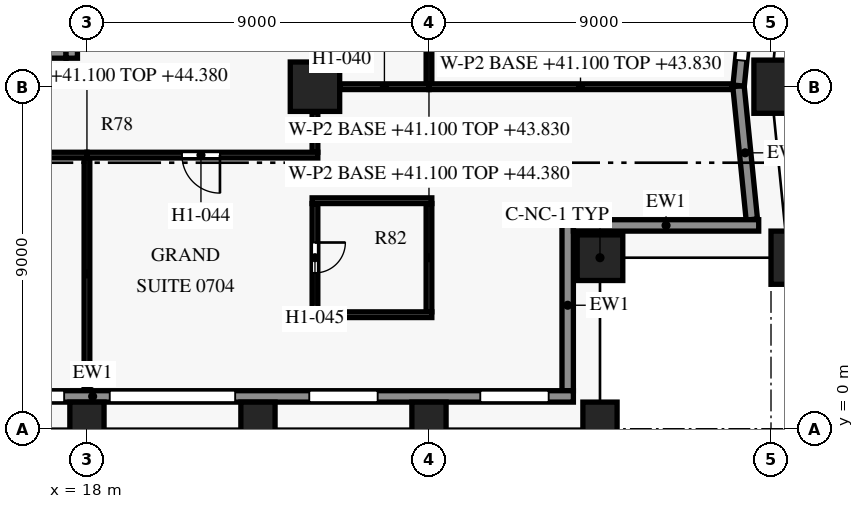
"""IFC4 building model, lengths in metres.
Left out: names, types, materials, properties, quantities, classifications, styles, units other than length and angle.
Written with IfcOpenShell. Run it as: python <this file> out.ifc"""

import sys

from ifc_helpers import new_model, si_unit, direction, frame, frame_2d, origin, origin_2d, place, context, subcontext, project, spatial, rectangle, extrude, element, fill, save


model = new_model("IFC4")
c1 = context("Model", 3, precision=1e-05, world=origin(), true_north=direction((0.0, 1.0)))
c2 = subcontext(c1, "Body", "Model", "MODEL_VIEW")
j1 = project(units=[si_unit("LENGTHUNIT", "METRE"), si_unit("PLANEANGLEUNIT", "RADIAN")], contexts=[c1])
p1 = place(None, origin())
s1 = spatial("IfcSite", under=j1, at=p1, CompositionType="ELEMENT")
p2 = place(p1, origin())
s2 = spatial("IfcBuilding", under=s1, at=p2, CompositionType="ELEMENT")
p3 = place(p2, frame((0.0, 0.0, 41.1)))
s3 = spatial("IfcBuildingStorey", under=s2, at=p3, CompositionType="ELEMENT", Elevation=41.1)
for number, where, z_axis, x_axis in (
    (1, (18.0, 0.0, 0.0), (0.0, 0.0, 1.0), (1.0, 0.0, 0.0)),
    (2, (22.5, 0.0, 0.0), (0.0, 0.0, 1.0), (1.0, 0.0, 0.0)),
    (3, (27.0, 0.0, 0.0), (0.0, 0.0, 1.0), (1.0, 0.0, 0.0)),
    (4, (31.5, 0.0, 0.0), (0.0, 0.0, 1.0), (1.0, 0.0, 0.0)),
    (5, (36.45, 4.5, 0.0), (0.0, 0.0, 1.0), (-0.1, 0.995, 0.0)),
    (6, (36.0, 9.0, 0.0), (0.0, 0.0, 1.0), (0.0, 1.0, 0.0)),
):
    element("IfcColumn", number, at=place(p3, frame(where, z_axis=z_axis, x_axis=x_axis)), inside=s3, PredefinedType="COLUMN", context=c2, shape_type="SweptSolid", body=[
        extrude(rectangle(XDim=0.9, YDim=1.4, at=origin_2d()), origin(), (0.0, 0.0, 1.0), 3.6),
    ])
p4 = place(p3, frame((31.5, 4.5, 0.0), z_axis=(0.0, 0.0, 1.0), x_axis=(1.0, 0.0, 0.0)))
e7 = element("IfcColumn", 7, at=p4, inside=s3, PredefinedType="COLUMN", context=c2, shape_type="SweptSolid", body=[
    extrude(rectangle(XDim=1.2, YDim=1.2, at=origin_2d()), origin(), (0.0, 0.0, 1.0), 3.6),
])
p5 = place(p3, frame((24.0, 9.0, 0.0), z_axis=(0.0, 0.0, 1.0), x_axis=(1.0, 0.0, 0.0)))
e8 = element("IfcColumn", 8, at=p5, inside=s3, PredefinedType="COLUMN", context=c2, shape_type="SweptSolid", body=[
    extrude(rectangle(XDim=1.3, YDim=1.3, at=origin_2d()), origin(), (0.0, 0.0, 1.0), 3.6),
])
p6 = place(p3, frame((30.8, 0.85, 0.0), z_axis=(0.0, 0.0, 1.0), x_axis=(-1.0, 0.0, 0.0)))
e9 = element("IfcWall", 9, at=p6, inside=s3, PredefinedType="SOLIDWALL", context=c2, shape_type="SweptSolid", body=[
    extrude(rectangle(XDim=25.3, YDim=0.3, at=frame_2d((12.65, 0.0))), origin(), (0.0, 0.0, 1.0), 2.95),
])
p7 = place(p6, frame((0.65, 0.0, 0.75)))
e10 = element("IfcOpeningElement", 10, at=p7, cuts=e9, PredefinedType="OPENING", context=c2, shape_type="SweptSolid", body=[
    extrude(rectangle(XDim=1.8, YDim=1.8, at=frame_2d((0.9, 0.9))), frame((0.0, 0.16, 0.0), z_axis=(0.0, -1.0, 0.0), x_axis=(1.0, 0.0, 0.0)), (0.0, 0.0, 1.0), 0.32),
])
p8 = place(p6, frame((5.15, 0.0, 0.75)))
e11 = element("IfcOpeningElement", 11, at=p8, cuts=e9, PredefinedType="OPENING", context=c2, shape_type="SweptSolid", body=[
    extrude(rectangle(XDim=1.8, YDim=1.8, at=frame_2d((0.9, 0.9))), frame((0.0, 0.16, 0.0), z_axis=(0.0, -1.0, 0.0), x_axis=(1.0, 0.0, 0.0)), (0.0, 0.0, 1.0), 0.32),
])
p9 = place(p6, frame((8.9, 0.0, 0.15)))
e12 = element("IfcOpeningElement", 12, at=p9, cuts=e9, PredefinedType="OPENING", context=c2, shape_type="SweptSolid", body=[
    extrude(rectangle(XDim=3.3, YDim=2.4, at=frame_2d((1.65, 1.2))), frame((0.0, 0.16, 0.0), z_axis=(0.0, -1.0, 0.0), x_axis=(1.0, 0.0, 0.0)), (0.0, 0.0, 1.0), 0.32),
])
p10 = place(p6, frame((13.4, 0.0, 0.15)))
e13 = element("IfcOpeningElement", 13, at=p10, cuts=e9, PredefinedType="OPENING", context=c2, shape_type="SweptSolid", body=[
    extrude(rectangle(XDim=3.3, YDim=2.4, at=frame_2d((1.65, 1.2))), frame((0.0, 0.16, 0.0), z_axis=(0.0, -1.0, 0.0), x_axis=(1.0, 0.0, 0.0)), (0.0, 0.0, 1.0), 0.32),
])
p11 = place(p6, frame((18.65, 0.0, 0.75)))
e14 = element("IfcOpeningElement", 14, at=p11, cuts=e9, PredefinedType="OPENING", context=c2, shape_type="SweptSolid", body=[
    extrude(rectangle(XDim=1.8, YDim=1.8, at=frame_2d((0.9, 0.9))), frame((0.0, 0.16, 0.0), z_axis=(0.0, -1.0, 0.0), x_axis=(1.0, 0.0, 0.0)), (0.0, 0.0, 1.0), 0.32),
])
p12 = place(p6, frame((23.15, 0.0, 0.75)))
e15 = element("IfcOpeningElement", 15, at=p12, cuts=e9, PredefinedType="OPENING", context=c2, shape_type="SweptSolid", body=[
    extrude(rectangle(XDim=1.8, YDim=1.8, at=frame_2d((0.9, 0.9))), frame((0.0, 0.16, 0.0), z_axis=(0.0, -1.0, 0.0), x_axis=(1.0, 0.0, 0.0)), (0.0, 0.0, 1.0), 0.32),
])
p13 = place(p3, frame((30.65, 5.5, 0.0), z_axis=(0.0, 0.0, 1.0), x_axis=(0.0, -1.0, 0.0)))
e16 = element("IfcWall", 16, at=p13, inside=s3, PredefinedType="SOLIDWALL", context=c2, shape_type="SweptSolid", body=[
    extrude(rectangle(XDim=4.502, YDim=0.3, at=frame_2d((2.251, 0.0))), origin(), (0.0, 0.0, 1.0), 2.95),
])
p14 = place(p3, frame((35.677, 5.35, 0.0), z_axis=(0.0, 0.0, 1.0), x_axis=(-1.0, 0.0, 0.0)))
e17 = element("IfcWall", 17, at=p14, inside=s3, PredefinedType="SOLIDWALL", context=c2, shape_type="SweptSolid", body=[
    extrude(rectangle(XDim=4.876, YDim=0.3, at=frame_2d((2.438, 0.0))), origin(), (0.0, 0.0, 1.0), 2.95),
])
p15 = place(p3, frame((35.144, 9.015, 0.0), z_axis=(0.0, 0.0, 1.0), x_axis=(0.099462600847, -0.995041301169, 0.0)))
e18 = element("IfcWall", 18, at=p15, inside=s3, PredefinedType="SOLIDWALL", context=c2, shape_type="SweptSolid", body=[
    extrude(rectangle(XDim=3.527, YDim=0.3, at=frame_2d((1.764, 0.0))), origin(), (0.0, 0.0, 1.0), 2.95),
])
p16 = place(p3, frame((36.047, 18.015, 0.0), z_axis=(0.0, 0.0, 1.0), x_axis=(-0.099522457379, -0.995035316196, 0.0)))
e19 = element("IfcWall", 19, at=p16, inside=s3, PredefinedType="SOLIDWALL", context=c2, shape_type="SweptSolid", body=[
    extrude(rectangle(XDim=9.03, YDim=0.3, at=frame_2d((4.515, 0.0))), origin(), (0.0, 0.0, 1.0), 2.95),
])
p17 = place(p16, frame((1.291, 0.0, 0.75)))
e20 = element("IfcOpeningElement", 20, at=p17, cuts=e19, PredefinedType="OPENING", context=c2, shape_type="SweptSolid", body=[
    extrude(rectangle(XDim=1.8, YDim=1.8, at=frame_2d((0.9, 0.9))), frame((0.0, 0.16, 0.0), z_axis=(0.0, -1.0, 0.0), x_axis=(1.0, 0.0, 0.0)), (0.0, 0.0, 1.0), 0.32),
])
p18 = place(p16, frame((5.064, 0.0, 0.15)))
e21 = element("IfcOpeningElement", 21, at=p18, cuts=e19, PredefinedType="OPENING", context=c2, shape_type="SweptSolid", body=[
    extrude(rectangle(XDim=3.3, YDim=2.4, at=frame_2d((1.65, 1.2))), frame((0.0, 0.16, 0.0), z_axis=(0.0, -1.0, 0.0), x_axis=(1.0, 0.0, 0.0)), (0.0, 0.0, 1.0), 0.32),
])
p19 = place(p3, frame((14.15, 9.9, 0.0), z_axis=(0.0, 0.0, 1.0), x_axis=(1.0, 0.0, 0.0)))
e22 = element("IfcWall", 22, at=p19, inside=s3, PredefinedType="SHEAR", context=c2, shape_type="SweptSolid", body=[
    extrude(rectangle(XDim=3.3, YDim=0.3, at=frame_2d((1.65, 0.0))), origin(), (0.0, 0.0, 1.0), 3.3),
])
p20 = place(p3, frame((17.6, 9.75, 0.0), z_axis=(0.0, 0.0, 1.0), x_axis=(0.0, 1.0, 0.0)))
e23 = element("IfcWall", 23, at=p20, inside=s3, PredefinedType="SHEAR", context=c2, shape_type="SweptSolid", body=[
    extrude(rectangle(XDim=8.3, YDim=0.3, at=frame_2d((4.15, 0.0))), origin(), (0.0, 0.0, 1.0), 3.3),
])
p21 = place(p20, frame((0.65, 0.0, 0.0)))
e24 = element("IfcOpeningElement", 24, at=p21, cuts=e23, PredefinedType="OPENING", context=c2, shape_type="SweptSolid", body=[
    extrude(rectangle(XDim=1.2, YDim=2.2, at=frame_2d((0.6, 1.1))), frame((0.0, 0.16, 0.0), z_axis=(0.0, -1.0, 0.0), x_axis=(1.0, 0.0, 0.0)), (0.0, 0.0, 1.0), 0.32),
])
p22 = place(p3, frame((23.925, 3.0, 0.0), z_axis=(0.0, 0.0, 1.0), x_axis=(1.0, 0.0, 0.0)))
e25 = element("IfcWall", 25, at=p22, inside=s3, PredefinedType="PARTITIONING", context=c2, shape_type="SweptSolid", body=[
    extrude(rectangle(XDim=3.15, YDim=0.15, at=frame_2d((1.575, 0.0))), origin(), (0.0, 0.0, 1.0), 2.58),
])
p23 = place(p3, frame((27.0, 3.075, 0.0), z_axis=(0.0, 0.0, 1.0), x_axis=(0.0, 1.0, 0.0)))
e26 = element("IfcWall", 26, at=p23, inside=s3, PredefinedType="PARTITIONING", context=c2, shape_type="SweptSolid", body=[
    extrude(rectangle(XDim=2.85, YDim=0.15, at=frame_2d((1.425, 0.0))), origin(), (0.0, 0.0, 1.0), 3.28),
])
p24 = place(p3, frame((24.0, 5.925, 0.0), z_axis=(0.0, 0.0, 1.0), x_axis=(0.0, -1.0, 0.0)))
e27 = element("IfcWall", 27, at=p24, inside=s3, PredefinedType="PARTITIONING", context=c2, shape_type="SweptSolid", body=[
    extrude(rectangle(XDim=2.85, YDim=0.15, at=frame_2d((1.425, 0.0))), origin(), (0.0, 0.0, 1.0), 2.58),
])
p25 = place(p24, frame((1.025, 0.0, 0.0)))
e28 = element("IfcOpeningElement", 28, at=p25, cuts=e27, PredefinedType="OPENING", context=c2, shape_type="SweptSolid", body=[
    extrude(rectangle(XDim=0.8, YDim=2.1, at=frame_2d((0.4, 1.05))), frame((0.0, 0.085, 0.0), z_axis=(0.0, -1.0, 0.0), x_axis=(1.0, 0.0, 0.0)), (0.0, 0.0, 1.0), 0.17),
])
p26 = place(p3, frame((27.075, 6.0, 0.0), z_axis=(0.0, 0.0, 1.0), x_axis=(-1.0, 0.0, 0.0)))
e29 = element("IfcWall", 29, at=p26, inside=s3, PredefinedType="PARTITIONING", context=c2, shape_type="SweptSolid", body=[
    extrude(rectangle(XDim=3.15, YDim=0.15, at=frame_2d((1.575, 0.0))), origin(), (0.0, 0.0, 1.0), 2.58),
])
p27 = place(p3, frame((18.0, 7.125, 0.0), z_axis=(0.0, 0.0, 1.0), x_axis=(0.0, -1.0, 0.0)))
e30 = element("IfcWall", 30, at=p27, inside=s3, PredefinedType="PARTITIONING", context=c2, shape_type="SweptSolid", body=[
    extrude(rectangle(XDim=6.105, YDim=0.15, at=frame_2d((3.052, 0.0))), origin(), (0.0, 0.0, 1.0), 3.28),
])
p28 = place(p3, frame((18.0, 7.2, 0.0), z_axis=(0.0, 0.0, 1.0), x_axis=(-1.0, 0.0, 0.0)))
e31 = element("IfcWall", 31, at=p28, inside=s3, PredefinedType="PARTITIONING", context=c2, shape_type="SweptSolid", body=[
    extrude(rectangle(XDim=6.075, YDim=0.15, at=frame_2d((3.038, 0.0))), origin(), (0.0, 0.0, 1.0), 2.58),
])
p29 = place(p28, frame((2.5, 0.0, 0.0)))
e32 = element("IfcOpeningElement", 32, at=p29, cuts=e31, PredefinedType="OPENING", context=c2, shape_type="SweptSolid", body=[
    extrude(rectangle(XDim=1.0, YDim=2.1, at=frame_2d((0.5, 1.05))), frame((0.0, 0.085, 0.0), z_axis=(0.0, -1.0, 0.0), x_axis=(1.0, 0.0, 0.0)), (0.0, 0.0, 1.0), 0.17),
])
p30 = place(p3, frame((24.075, 7.2, 0.0), z_axis=(0.0, 0.0, 1.0), x_axis=(-1.0, 0.0, 0.0)))
e33 = element("IfcWall", 33, at=p30, inside=s3, PredefinedType="PARTITIONING", context=c2, shape_type="SweptSolid", body=[
    extrude(rectangle(XDim=6.075, YDim=0.15, at=frame_2d((3.038, 0.0))), origin(), (0.0, 0.0, 1.0), 2.58),
])
p31 = place(p30, frame((2.575, 0.0, 0.0)))
e34 = element("IfcOpeningElement", 34, at=p31, cuts=e33, PredefinedType="OPENING", context=c2, shape_type="SweptSolid", body=[
    extrude(rectangle(XDim=1.0, YDim=2.1, at=frame_2d((0.5, 1.05))), frame((0.0, 0.085, 0.0), z_axis=(0.0, -1.0, 0.0), x_axis=(1.0, 0.0, 0.0)), (0.0, 0.0, 1.0), 0.17),
])
p32 = place(p3, frame((24.0, 8.345, 0.0), z_axis=(0.0, 0.0, 1.0), x_axis=(0.0, -1.0, 0.0)))
e35 = element("IfcWall", 35, at=p32, inside=s3, PredefinedType="PARTITIONING", context=c2, shape_type="SweptSolid", body=[
    extrude(rectangle(XDim=1.07, YDim=0.15, at=frame_2d((0.535, 0.0))), origin(), (0.0, 0.0, 1.0), 2.58),
])
p33 = place(p3, frame((27.0, 9.0, 0.0), z_axis=(0.0, 0.0, 1.0), x_axis=(-1.0, 0.0, 0.0)))
e36 = element("IfcWall", 36, at=p33, inside=s3, PredefinedType="PARTITIONING", context=c2, shape_type="SweptSolid", body=[
    extrude(rectangle(XDim=2.345, YDim=0.15, at=frame_2d((1.172, 0.0))), origin(), (0.0, 0.0, 1.0), 2.73),
])
p34 = place(p3, frame((34.975, 9.0, 0.0), z_axis=(0.0, 0.0, 1.0), x_axis=(-1.0, 0.0, 0.0)))
e37 = element("IfcWall", 37, at=p34, inside=s3, PredefinedType="PARTITIONING", context=c2, shape_type="SweptSolid", body=[
    extrude(rectangle(XDim=7.975, YDim=0.15, at=frame_2d((3.988, 0.0))), origin(), (0.0, 0.0, 1.0), 2.73),
])
p35 = place(p3, frame((27.0, 9.075, 0.0), z_axis=(0.0, 0.0, 1.0), x_axis=(0.0, 1.0, 0.0)))
e38 = element("IfcWall", 38, at=p35, inside=s3, PredefinedType="PARTITIONING", context=c2, shape_type="SweptSolid", body=[
    extrude(rectangle(XDim=1.95, YDim=0.15, at=frame_2d((0.975, 0.0))), origin(), (0.0, 0.0, 1.0), 2.73),
])
p36 = place(p3, frame((24.0, 11.025, 0.0), z_axis=(0.0, 0.0, 1.0), x_axis=(0.0, -1.0, 0.0)))
e39 = element("IfcWall", 39, at=p36, inside=s3, PredefinedType="PARTITIONING", context=c2, shape_type="SweptSolid", body=[
    extrude(rectangle(XDim=1.37, YDim=0.15, at=frame_2d((0.685, 0.0))), origin(), (0.0, 0.0, 1.0), 2.58),
])
p37 = place(p7, origin())
e40 = element("IfcWindow", 40, at=p37, inside=s3, PartitioningType="SINGLE_PANEL", PredefinedType="WINDOW", context=c2, shape_type="SweptSolid", body=[
    extrude(rectangle(XDim=1.8, YDim=1.8, at=frame_2d((0.9, 0.9))), frame((0.0, 0.03, 0.0), z_axis=(0.0, -1.0, 0.0), x_axis=(1.0, 0.0, 0.0)), (0.0, 0.0, 1.0), 0.06),
])
fill(e10, e40)
p38 = place(p8, origin())
e41 = element("IfcWindow", 41, at=p38, inside=s3, PartitioningType="SINGLE_PANEL", PredefinedType="WINDOW", context=c2, shape_type="SweptSolid", body=[
    extrude(rectangle(XDim=1.8, YDim=1.8, at=frame_2d((0.9, 0.9))), frame((0.0, 0.03, 0.0), z_axis=(0.0, -1.0, 0.0), x_axis=(1.0, 0.0, 0.0)), (0.0, 0.0, 1.0), 0.06),
])
fill(e11, e41)
p39 = place(p9, origin())
e42 = element("IfcWindow", 42, at=p39, inside=s3, PartitioningType="SINGLE_PANEL", PredefinedType="WINDOW", context=c2, shape_type="SweptSolid", body=[
    extrude(rectangle(XDim=3.3, YDim=2.4, at=frame_2d((1.65, 1.2))), frame((0.0, 0.03, 0.0), z_axis=(0.0, -1.0, 0.0), x_axis=(1.0, 0.0, 0.0)), (0.0, 0.0, 1.0), 0.06),
])
fill(e12, e42)
p40 = place(p10, origin())
e43 = element("IfcWindow", 43, at=p40, inside=s3, PartitioningType="SINGLE_PANEL", PredefinedType="WINDOW", context=c2, shape_type="SweptSolid", body=[
    extrude(rectangle(XDim=3.3, YDim=2.4, at=frame_2d((1.65, 1.2))), frame((0.0, 0.03, 0.0), z_axis=(0.0, -1.0, 0.0), x_axis=(1.0, 0.0, 0.0)), (0.0, 0.0, 1.0), 0.06),
])
fill(e13, e43)
p41 = place(p18, origin())
e44 = element("IfcWindow", 44, at=p41, inside=s3, PartitioningType="SINGLE_PANEL", PredefinedType="WINDOW", context=c2, shape_type="SweptSolid", body=[
    extrude(rectangle(XDim=3.3, YDim=2.4, at=frame_2d((1.65, 1.2))), frame((0.0, 0.03, 0.0), z_axis=(0.0, -1.0, 0.0), x_axis=(1.0, 0.0, 0.0)), (0.0, 0.0, 1.0), 0.06),
])
fill(e21, e44)
p42 = place(p31, origin())
e45 = element("IfcDoor", 45, at=p42, inside=s3, OperationType="SINGLE_SWING_LEFT", PredefinedType="DOOR", context=c2, shape_type="SweptSolid", body=[
    extrude(rectangle(XDim=1.0, YDim=2.1, at=frame_2d((0.5, 1.05))), frame((0.0, 0.025, 0.0), z_axis=(0.0, -1.0, 0.0), x_axis=(1.0, 0.0, 0.0)), (0.0, 0.0, 1.0), 0.05),
])
fill(e34, e45)
p43 = place(p25, origin())
e46 = element("IfcDoor", 46, at=p43, inside=s3, OperationType="SINGLE_SWING_RIGHT", PredefinedType="DOOR", context=c2, shape_type="SweptSolid", body=[
    extrude(rectangle(XDim=0.8, YDim=2.1, at=frame_2d((0.4, 1.05))), frame((0.0, 0.025, 0.0), z_axis=(0.0, -1.0, 0.0), x_axis=(1.0, 0.0, 0.0)), (0.0, 0.0, 1.0), 0.05),
])
fill(e28, e46)
save(model, sys.argv[1])
